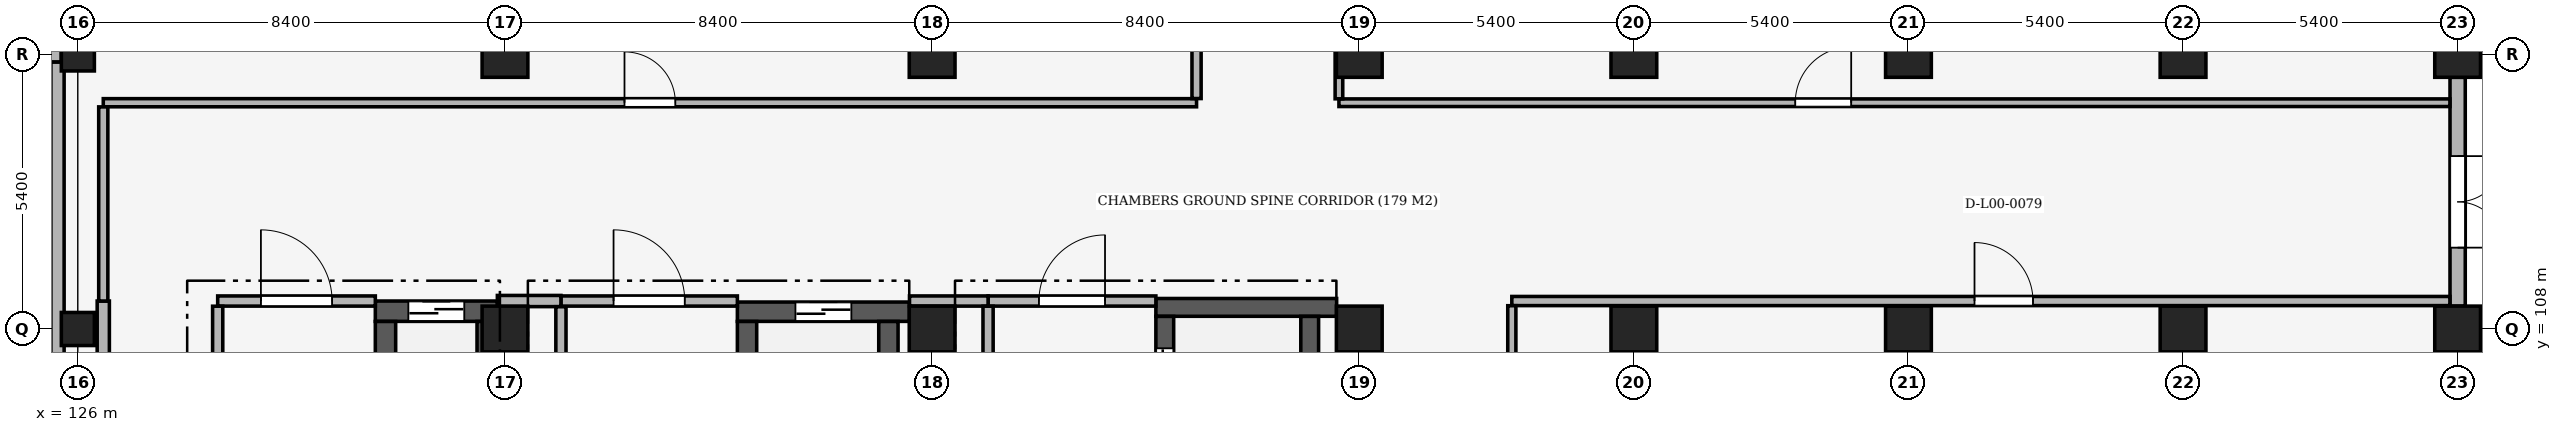
"""IFC4 building model, lengths in metres.
Left out: names, types, materials, properties, quantities, classifications, styles, units other than length and angle.
Written with IfcOpenShell. Run it as: python <this file> out.ifc"""

import sys

from ifc_helpers import new_model, si_unit, direction, frame, frame_2d, origin, origin_2d, place, context, subcontext, project, spatial, rectangle, extrude, element, fill, save


model = new_model("IFC4")
c1 = context("Model", 3, precision=1e-05, world=origin(), true_north=direction((0.0, 1.0)))
c2 = subcontext(c1, "Body", "Model", "MODEL_VIEW")
j1 = project(units=[si_unit("LENGTHUNIT", "METRE"), si_unit("PLANEANGLEUNIT", "RADIAN")], contexts=[c1])
p1 = place(None, origin())
s1 = spatial("IfcSite", under=j1, at=p1, CompositionType="ELEMENT")
p2 = place(p1, origin())
s2 = spatial("IfcBuilding", under=s1, at=p2, CompositionType="ELEMENT")
p3 = place(p2, origin())
s3 = spatial("IfcBuildingStorey", under=s2, at=p3, CompositionType="ELEMENT", Elevation=0.0)
for number, where, z_axis, x_axis in (
    (1, (126.0, 108.0, 0.0), (0.0, 0.0, 1.0), (1.0, 0.0, 0.0)),
    (2, (126.0, 113.4, 0.0), (0.0, 0.0, 1.0), (1.0, 0.0, 0.0)),
):
    element("IfcColumn", number, at=place(p3, frame(where, z_axis=z_axis, x_axis=x_axis)), inside=s3, PredefinedType="COLUMN", context=c2, shape_type="SweptSolid", body=[
        extrude(rectangle(XDim=0.65, YDim=0.65, at=origin_2d()), origin(), (0.0, 0.0, 1.0), 5.1),
    ])
for number, where, z_axis, x_axis in (
    (3, (134.4, 108.0, 0.0), (0.0, 0.0, 1.0), (1.0, 0.0, 0.0)),
    (4, (134.4, 113.4, 0.0), (0.0, 0.0, 1.0), (1.0, 0.0, 0.0)),
    (5, (142.8, 108.0, 0.0), (0.0, 0.0, 1.0), (1.0, 0.0, 0.0)),
    (6, (142.8, 113.4, 0.0), (0.0, 0.0, 1.0), (1.0, 0.0, 0.0)),
    (7, (151.2, 108.0, 0.0), (0.0, 0.0, 1.0), (1.0, 0.0, 0.0)),
    (8, (151.2, 113.4, 0.0), (0.0, 0.0, 1.0), (1.0, 0.0, 0.0)),
    (9, (156.6, 108.0, 0.0), (0.0, 0.0, 1.0), (1.0, 0.0, 0.0)),
    (10, (156.6, 113.4, 0.0), (0.0, 0.0, 1.0), (1.0, 0.0, 0.0)),
    (11, (162.0, 108.0, 0.0), (0.0, 0.0, 1.0), (1.0, 0.0, 0.0)),
    (12, (162.0, 113.4, 0.0), (0.0, 0.0, 1.0), (1.0, 0.0, 0.0)),
    (13, (167.4, 108.0, 0.0), (0.0, 0.0, 1.0), (1.0, 0.0, 0.0)),
    (14, (167.4, 113.4, 0.0), (0.0, 0.0, 1.0), (1.0, 0.0, 0.0)),
    (15, (172.8, 108.0, 0.0), (0.0, 0.0, 1.0), (1.0, 0.0, 0.0)),
    (16, (172.8, 113.4, 0.0), (0.0, 0.0, 1.0), (1.0, 0.0, 0.0)),
):
    element("IfcColumn", number, at=place(p3, frame(where, z_axis=z_axis, x_axis=x_axis)), inside=s3, PredefinedType="COLUMN", context=c2, shape_type="SweptSolid", body=[
        extrude(rectangle(XDim=0.9, YDim=0.9, at=origin_2d()), origin(), (0.0, 0.0, 1.0), 5.1),
    ])
p4 = place(p3, frame((117.925, 113.4, 0.0), z_axis=(0.0, 0.0, 1.0), x_axis=(1.0, 0.0, 0.0)))
e17 = element("IfcWall", 17, at=p4, inside=s3, PredefinedType="SOLIDWALL", context=c2, shape_type="SweptSolid", body=[
    extrude(rectangle(XDim=7.75, YDim=0.3, at=frame_2d((3.875, 0.0))), origin(), (0.0, 0.0, 1.0), 4.12),
])
p5 = place(p4, frame((1.183, 0.0, 0.9)))
e18 = element("IfcOpeningElement", 18, at=p5, cuts=e17, PredefinedType="OPENING", context=c2, shape_type="SweptSolid", body=[
    extrude(rectangle(XDim=2.1, YDim=2.1, at=frame_2d((1.05, 1.05))), frame((0.0, 0.165, 0.0), z_axis=(0.0, -1.0, 0.0), x_axis=(1.0, 0.0, 0.0)), (0.0, 0.0, 1.0), 0.33),
])
p6 = place(p4, frame((4.467, 0.0, 0.9)))
e19 = element("IfcOpeningElement", 19, at=p6, cuts=e17, PredefinedType="OPENING", context=c2, shape_type="SweptSolid", body=[
    extrude(rectangle(XDim=2.1, YDim=2.1, at=frame_2d((1.05, 1.05))), frame((0.0, 0.165, 0.0), z_axis=(0.0, -1.0, 0.0), x_axis=(1.0, 0.0, 0.0)), (0.0, 0.0, 1.0), 0.33),
])
p7 = place(p3, frame((172.8, 112.95, 0.0), z_axis=(0.0, 0.0, 1.0), x_axis=(0.0, -1.0, 0.0)))
e20 = element("IfcWall", 20, at=p7, inside=s3, PredefinedType="SOLIDWALL", context=c2, shape_type="SweptSolid", body=[
    extrude(rectangle(XDim=4.5, YDim=0.3, at=frame_2d((2.25, 0.0))), origin(), (0.0, 0.0, 1.0), 4.17),
])
p8 = place(p7, frame((1.55, 0.0, 0.0)))
e21 = element("IfcOpeningElement", 21, at=p8, cuts=e20, PredefinedType="OPENING", context=c2, shape_type="SweptSolid", body=[
    extrude(rectangle(XDim=1.8, YDim=2.2, at=frame_2d((0.9, 1.1))), frame((0.0, 0.165, 0.0), z_axis=(0.0, -1.0, 0.0), x_axis=(1.0, 0.0, 0.0)), (0.0, 0.0, 1.0), 0.33),
])
p9 = place(p3, frame((131.85, 108.35, 0.0), z_axis=(0.0, 0.0, 1.0), x_axis=(1.0, 0.0, 0.0)))
e22 = element("IfcWall", 22, at=p9, inside=s3, PredefinedType="SHEAR", context=c2, shape_type="SweptSolid", body=[
    extrude(rectangle(XDim=2.4, YDim=0.4, at=frame_2d((1.2, 0.0))), origin(), (0.0, 0.0, 1.0), 4.82),
])
p10 = place(p9, frame((0.65, 0.0, 0.0)))
e23 = element("IfcOpeningElement", 23, at=p10, cuts=e22, PredefinedType="OPENING", context=c2, shape_type="SweptSolid", body=[
    extrude(rectangle(XDim=1.1, YDim=2.15, at=frame_2d((0.55, 1.075))), frame((0.0, 0.215, 0.0), z_axis=(0.0, -1.0, 0.0), x_axis=(1.0, 0.0, 0.0)), (0.0, 0.0, 1.0), 0.43),
])
for number, where, z_axis, x_axis in (
    (24, (132.05, 106.093, 0.0), (0.0, 0.0, 1.0), (0.0, 1.0, 0.0)),
    (25, (134.05, 106.093, 0.0), (0.0, 0.0, 1.0), (0.0, 1.0, 0.0)),
):
    element("IfcWall", number, at=place(p3, frame(where, z_axis=z_axis, x_axis=x_axis)), inside=s3, PredefinedType="SHEAR", context=c2, shape_type="SweptSolid", body=[
        extrude(rectangle(XDim=2.055, YDim=0.4, at=frame_2d((1.027, 0.0))), origin(), (0.0, 0.0, 1.0), 4.82),
    ])
p11 = place(p3, frame((138.97, 108.34, 0.0), z_axis=(0.0, 0.0, 1.0), x_axis=(1.0, 0.0, 0.0)))
e26 = element("IfcWall", 26, at=p11, inside=s3, PredefinedType="SHEAR", context=c2, shape_type="SweptSolid", body=[
    extrude(rectangle(XDim=3.385, YDim=0.38, at=frame_2d((1.692, 0.0))), origin(), (0.0, 0.0, 1.0), 4.82),
])
p12 = place(p11, frame((1.142, 0.0, 0.0)))
e27 = element("IfcOpeningElement", 27, at=p12, cuts=e26, PredefinedType="OPENING", context=c2, shape_type="SweptSolid", body=[
    extrude(rectangle(XDim=1.1, YDim=2.15, at=frame_2d((0.55, 1.075))), frame((0.0, 0.205, 0.0), z_axis=(0.0, -1.0, 0.0), x_axis=(1.0, 0.0, 0.0)), (0.0, 0.0, 1.0), 0.41),
])
for number, where, z_axis, x_axis in (
    (28, (139.16, 106.093, 0.0), (0.0, 0.0, 1.0), (0.0, 1.0, 0.0)),
    (29, (141.94, 106.093, 0.0), (0.0, 0.0, 1.0), (0.0, 1.0, 0.0)),
):
    element("IfcWall", number, at=place(p3, frame(where, z_axis=z_axis, x_axis=x_axis)), inside=s3, PredefinedType="SHEAR", context=c2, shape_type="SweptSolid", body=[
        extrude(rectangle(XDim=2.055, YDim=0.38, at=frame_2d((1.027, 0.0))), origin(), (0.0, 0.0, 1.0), 4.82),
    ])
p13 = place(p3, frame((147.2, 108.425, 0.0), z_axis=(0.0, 0.0, 1.0), x_axis=(1.0, 0.0, 0.0)))
e30 = element("IfcWall", 30, at=p13, inside=s3, PredefinedType="SHEAR", context=c2, shape_type="SweptSolid", body=[
    extrude(rectangle(XDim=3.555, YDim=0.35, at=frame_2d((1.777, 0.0))), origin(), (0.0, 0.0, 1.0), 4.82),
])
p14 = place(p3, frame((147.375, 105.793, 0.0), z_axis=(0.0, 0.0, 1.0), x_axis=(0.0, 1.0, 0.0)))
e31 = element("IfcWall", 31, at=p14, inside=s3, PredefinedType="SHEAR", context=c2, shape_type="SweptSolid", body=[
    extrude(rectangle(XDim=2.455, YDim=0.35, at=frame_2d((1.228, 0.0))), origin(), (0.0, 0.0, 1.0), 4.82),
])
p15 = place(p14, frame((0.627, 0.0, 0.0)))
e32 = element("IfcOpeningElement", 32, at=p15, cuts=e31, PredefinedType="OPENING", context=c2, shape_type="SweptSolid", body=[
    extrude(rectangle(XDim=1.2, YDim=2.15, at=frame_2d((0.6, 1.075))), frame((0.0, 0.19, 0.0), z_axis=(0.0, -1.0, 0.0), x_axis=(1.0, 0.0, 0.0)), (0.0, 0.0, 1.0), 0.38),
])
p16 = place(p3, frame((150.225, 105.793, 0.0), z_axis=(0.0, 0.0, 1.0), x_axis=(0.0, 1.0, 0.0)))
e33 = element("IfcWall", 33, at=p16, inside=s3, PredefinedType="SHEAR", context=c2, shape_type="SweptSolid", body=[
    extrude(rectangle(XDim=2.455, YDim=0.35, at=frame_2d((1.228, 0.0))), origin(), (0.0, 0.0, 1.0), 4.82),
])
p17 = place(p3, frame((128.75, 108.55, 0.0), z_axis=(0.0, 0.0, 1.0), x_axis=(1.0, 0.0, 0.0)))
e34 = element("IfcWall", 34, at=p17, inside=s3, PredefinedType="PARTITIONING", context=c2, shape_type="SweptSolid", body=[
    extrude(rectangle(XDim=3.1, YDim=0.2, at=frame_2d((1.55, 0.0))), origin(), (0.0, 0.0, 1.0), 4.82),
])
p18 = place(p17, frame((0.85, 0.0, 0.0)))
e35 = element("IfcOpeningElement", 35, at=p18, cuts=e34, PredefinedType="OPENING", context=c2, shape_type="SweptSolid", body=[
    extrude(rectangle(XDim=1.4, YDim=2.2, at=frame_2d((0.7, 1.1))), frame((0.0, 0.115, 0.0), z_axis=(0.0, -1.0, 0.0), x_axis=(1.0, 0.0, 0.0)), (0.0, 0.0, 1.0), 0.23),
])
p19 = place(p3, frame((135.5, 108.55, 0.0), z_axis=(0.0, 0.0, 1.0), x_axis=(1.0, 0.0, 0.0)))
e36 = element("IfcWall", 36, at=p19, inside=s3, PredefinedType="PARTITIONING", context=c2, shape_type="SweptSolid", body=[
    extrude(rectangle(XDim=3.47, YDim=0.2, at=frame_2d((1.735, 0.0))), origin(), (0.0, 0.0, 1.0), 4.82),
])
p20 = place(p19, frame((1.035, 0.0, 0.0)))
e37 = element("IfcOpeningElement", 37, at=p20, cuts=e36, PredefinedType="OPENING", context=c2, shape_type="SweptSolid", body=[
    extrude(rectangle(XDim=1.4, YDim=2.2, at=frame_2d((0.7, 1.1))), frame((0.0, 0.115, 0.0), z_axis=(0.0, -1.0, 0.0), x_axis=(1.0, 0.0, 0.0)), (0.0, 0.0, 1.0), 0.23),
])
p21 = place(p3, frame((143.9, 108.55, 0.0), z_axis=(0.0, 0.0, 1.0), x_axis=(1.0, 0.0, 0.0)))
e38 = element("IfcWall", 38, at=p21, inside=s3, PredefinedType="PARTITIONING", context=c2, shape_type="SweptSolid", body=[
    extrude(rectangle(XDim=3.3, YDim=0.2, at=frame_2d((1.65, 0.0))), origin(), (0.0, 0.0, 1.0), 4.82),
])
p22 = place(p21, frame((1.0, 0.0, 0.0)))
e39 = element("IfcOpeningElement", 39, at=p22, cuts=e38, PredefinedType="OPENING", context=c2, shape_type="SweptSolid", body=[
    extrude(rectangle(XDim=1.3, YDim=2.2, at=frame_2d((0.65, 1.1))), frame((0.0, 0.115, 0.0), z_axis=(0.0, -1.0, 0.0), x_axis=(1.0, 0.0, 0.0)), (0.0, 0.0, 1.0), 0.23),
])
p23 = place(p3, frame((134.25, 108.55, 0.0), z_axis=(0.0, 0.0, 1.0), x_axis=(1.0, 0.0, 0.0)))
e40 = element("IfcWall", 40, at=p23, inside=s3, PredefinedType="PARTITIONING", context=c2, shape_type="SweptSolid", body=[
    extrude(rectangle(XDim=1.25, YDim=0.22, at=frame_2d((0.625, 0.0))), origin(), (0.0, 0.0, 1.0), 4.17),
])
p24 = place(p3, frame((142.355, 108.55, 0.0), z_axis=(0.0, 0.0, 1.0), x_axis=(1.0, 0.0, 0.0)))
e41 = element("IfcWall", 41, at=p24, inside=s3, PredefinedType="PARTITIONING", context=c2, shape_type="SweptSolid", body=[
    extrude(rectangle(XDim=1.545, YDim=0.2, at=frame_2d((0.772, 0.0))), origin(), (0.0, 0.0, 1.0), 4.17),
])
p25 = place(p3, frame((154.2, 108.55, 0.0), z_axis=(0.0, 0.0, 1.0), x_axis=(1.0, 0.0, 0.0)))
e42 = element("IfcWall", 42, at=p25, inside=s3, PredefinedType="PARTITIONING", context=c2, shape_type="SweptSolid", body=[
    extrude(rectangle(XDim=18.448, YDim=0.18, at=frame_2d((9.224, 0.0))), origin(), (0.0, 0.0, 1.0), 4.17),
])
p26 = place(p25, frame((9.099, 0.0, 0.0)))
e43 = element("IfcOpeningElement", 43, at=p26, cuts=e42, PredefinedType="OPENING", context=c2, shape_type="SweptSolid", body=[
    extrude(rectangle(XDim=1.15, YDim=2.15, at=frame_2d((0.575, 1.075))), frame((0.0, 0.105, 0.0), z_axis=(0.0, -1.0, 0.0), x_axis=(1.0, 0.0, 0.0)), (0.0, 0.0, 1.0), 0.21),
])
p27 = place(p3, frame((126.5, 112.45, 0.0), z_axis=(0.0, 0.0, 1.0), x_axis=(1.0, 0.0, 0.0)))
e44 = element("IfcWall", 44, at=p27, inside=s3, PredefinedType="PARTITIONING", context=c2, shape_type="SweptSolid", body=[
    extrude(rectangle(XDim=21.5, YDim=0.16, at=frame_2d((10.75, 0.0))), origin(), (0.0, 0.0, 1.0), 4.17),
])
p28 = place(p27, frame((10.25, 0.0, 0.0)))
e45 = element("IfcOpeningElement", 45, at=p28, cuts=e44, PredefinedType="OPENING", context=c2, shape_type="SweptSolid", body=[
    extrude(rectangle(XDim=1.0, YDim=2.1, at=frame_2d((0.5, 1.05))), frame((0.0, 0.095, 0.0), z_axis=(0.0, -1.0, 0.0), x_axis=(1.0, 0.0, 0.0)), (0.0, 0.0, 1.0), 0.19),
])
p29 = place(p3, frame((150.8, 112.45, 0.0), z_axis=(0.0, 0.0, 1.0), x_axis=(1.0, 0.0, 0.0)))
e46 = element("IfcWall", 46, at=p29, inside=s3, PredefinedType="PARTITIONING", context=c2, shape_type="SweptSolid", body=[
    extrude(rectangle(XDim=21.848, YDim=0.15, at=frame_2d((10.924, 0.0))), origin(), (0.0, 0.0, 1.0), 4.17),
])
p30 = place(p29, frame((8.974, 0.0, 0.0)))
e47 = element("IfcOpeningElement", 47, at=p30, cuts=e46, PredefinedType="OPENING", context=c2, shape_type="SweptSolid", body=[
    extrude(rectangle(XDim=1.1, YDim=2.1, at=frame_2d((0.55, 1.05))), frame((0.0, 0.09, 0.0), z_axis=(0.0, -1.0, 0.0), x_axis=(1.0, 0.0, 0.0)), (0.0, 0.0, 1.0), 0.18),
])
p31 = place(p3, frame((125.6, 103.522, 0.0), z_axis=(0.0, 0.0, 1.0), x_axis=(0.0, 1.0, 0.0)))
e48 = element("IfcWall", 48, at=p31, inside=s3, PredefinedType="PARTITIONING", context=c2, shape_type="SweptSolid", body=[
    extrude(rectangle(XDim=9.726, YDim=0.26, at=frame_2d((4.863, 0.0))), origin(), (0.0, 0.0, 1.0), 4.12),
])
p32 = place(p3, frame((126.5, 103.522, 0.0), z_axis=(0.0, 0.0, 1.0), x_axis=(0.0, 1.0, 0.0)))
e49 = element("IfcWall", 49, at=p32, inside=s3, PredefinedType="PARTITIONING", context=c2, shape_type="SweptSolid", body=[
    extrude(rectangle(XDim=5.028, YDim=0.24, at=frame_2d((2.514, 0.0))), origin(), (0.0, 0.0, 1.0), 4.82),
])
p33 = place(p3, frame((126.5, 108.55, 0.0), z_axis=(0.0, 0.0, 1.0), x_axis=(0.0, 1.0, 0.0)))
e50 = element("IfcWall", 50, at=p33, inside=s3, PredefinedType="PARTITIONING", context=c2, shape_type="SweptSolid", body=[
    extrude(rectangle(XDim=3.818, YDim=0.18, at=frame_2d((1.909, 0.0))), origin(), (0.0, 0.0, 1.0), 4.82),
])
p34 = place(p3, frame((128.75, 103.652, 0.0), z_axis=(0.0, 0.0, 1.0), x_axis=(0.0, 1.0, 0.0)))
e51 = element("IfcWall", 51, at=p34, inside=s3, PredefinedType="PARTITIONING", context=c2, shape_type="SweptSolid", body=[
    extrude(rectangle(XDim=4.796, YDim=0.2, at=frame_2d((2.398, 0.0))), origin(), (0.0, 0.0, 1.0), 4.82),
])
p35 = place(p3, frame((135.5, 103.632, 0.0), z_axis=(0.0, 0.0, 1.0), x_axis=(0.0, 1.0, 0.0)))
e52 = element("IfcWall", 52, at=p35, inside=s3, PredefinedType="PARTITIONING", context=c2, shape_type="SweptSolid", body=[
    extrude(rectangle(XDim=4.806, YDim=0.2, at=frame_2d((2.403, 0.0))), origin(), (0.0, 0.0, 1.0), 4.82),
])
p36 = place(p3, frame((143.9, 103.602, 0.0), z_axis=(0.0, 0.0, 1.0), x_axis=(0.0, 1.0, 0.0)))
e53 = element("IfcWall", 53, at=p36, inside=s3, PredefinedType="PARTITIONING", context=c2, shape_type="SweptSolid", body=[
    extrude(rectangle(XDim=4.846, YDim=0.2, at=frame_2d((2.423, 0.0))), origin(), (0.0, 0.0, 1.0), 4.82),
])
p37 = place(p3, frame((148.0, 112.532, 0.0), z_axis=(0.0, 0.0, 1.0), x_axis=(0.0, 1.0, 0.0)))
e54 = element("IfcWall", 54, at=p37, inside=s3, PredefinedType="PARTITIONING", context=c2, shape_type="SweptSolid", body=[
    extrude(rectangle(XDim=6.116, YDim=0.18, at=frame_2d((3.058, 0.0))), origin(), (0.0, 0.0, 1.0), 4.12),
])
p38 = place(p3, frame((150.8, 112.527, 0.0), z_axis=(0.0, 0.0, 1.0), x_axis=(0.0, 1.0, 0.0)))
e55 = element("IfcWall", 55, at=p38, inside=s3, PredefinedType="PARTITIONING", context=c2, shape_type="SweptSolid", body=[
    extrude(rectangle(XDim=6.13, YDim=0.15, at=frame_2d((3.065, 0.0))), origin(), (0.0, 0.0, 1.0), 4.12),
])
p39 = place(p3, frame((154.2, 93.752, 0.0), z_axis=(0.0, 0.0, 1.0), x_axis=(0.0, 1.0, 0.0)))
e56 = element("IfcWall", 56, at=p39, inside=s3, PredefinedType="PARTITIONING", context=c2, shape_type="SweptSolid", body=[
    extrude(rectangle(XDim=14.706, YDim=0.16, at=frame_2d((7.353, 0.0))), origin(), (0.0, 0.0, 1.0), 4.22),
])
p40 = place(p8, origin())
e57 = element("IfcDoor", 57, at=p40, inside=s3, OperationType="DOUBLE_DOOR_SINGLE_SWING", PredefinedType="DOOR", context=c2, shape_type="SweptSolid", body=[
    extrude(rectangle(XDim=1.8, YDim=2.2, at=frame_2d((0.9, 1.1))), frame((0.0, 0.025, 0.0), z_axis=(0.0, -1.0, 0.0), x_axis=(1.0, 0.0, 0.0)), (0.0, 0.0, 1.0), 0.05),
])
fill(e21, e57)
p41 = place(p10, origin())
e58 = element("IfcDoor", 58, at=p41, inside=s3, OperationType="DOUBLE_DOOR_SLIDING", PredefinedType="DOOR", context=c2, shape_type="SweptSolid", body=[
    extrude(rectangle(XDim=1.1, YDim=2.15, at=frame_2d((0.55, 1.075))), frame((0.0, 0.025, 0.0), z_axis=(0.0, -1.0, 0.0), x_axis=(1.0, 0.0, 0.0)), (0.0, 0.0, 1.0), 0.05),
])
fill(e23, e58)
p42 = place(p12, origin())
e59 = element("IfcDoor", 59, at=p42, inside=s3, OperationType="DOUBLE_DOOR_SLIDING", PredefinedType="DOOR", context=c2, shape_type="SweptSolid", body=[
    extrude(rectangle(XDim=1.1, YDim=2.15, at=frame_2d((0.55, 1.075))), frame((0.0, 0.025, 0.0), z_axis=(0.0, -1.0, 0.0), x_axis=(1.0, 0.0, 0.0)), (0.0, 0.0, 1.0), 0.05),
])
fill(e27, e59)
p43 = place(p15, origin())
e60 = element("IfcDoor", 60, at=p43, inside=s3, OperationType="DOUBLE_DOOR_SLIDING", PredefinedType="DOOR", context=c2, shape_type="SweptSolid", body=[
    extrude(rectangle(XDim=1.2, YDim=2.15, at=frame_2d((0.6, 1.075))), frame((0.0, 0.025, 0.0), z_axis=(0.0, -1.0, 0.0), x_axis=(1.0, 0.0, 0.0)), (0.0, 0.0, 1.0), 0.05),
])
fill(e32, e60)
p44 = place(p18, origin())
e61 = element("IfcDoor", 61, at=p44, inside=s3, OperationType="SINGLE_SWING_LEFT", PredefinedType="DOOR", context=c2, shape_type="SweptSolid", body=[
    extrude(rectangle(XDim=1.4, YDim=2.2, at=frame_2d((0.7, 1.1))), frame((0.0, 0.025, 0.0), z_axis=(0.0, -1.0, 0.0), x_axis=(1.0, 0.0, 0.0)), (0.0, 0.0, 1.0), 0.05),
])
fill(e35, e61)
p45 = place(p20, origin())
e62 = element("IfcDoor", 62, at=p45, inside=s3, OperationType="SINGLE_SWING_LEFT", PredefinedType="DOOR", context=c2, shape_type="SweptSolid", body=[
    extrude(rectangle(XDim=1.4, YDim=2.2, at=frame_2d((0.7, 1.1))), frame((0.0, 0.025, 0.0), z_axis=(0.0, -1.0, 0.0), x_axis=(1.0, 0.0, 0.0)), (0.0, 0.0, 1.0), 0.05),
])
fill(e37, e62)
p46 = place(p22, origin())
e63 = element("IfcDoor", 63, at=p46, inside=s3, OperationType="SINGLE_SWING_RIGHT", PredefinedType="DOOR", context=c2, shape_type="SweptSolid", body=[
    extrude(rectangle(XDim=1.3, YDim=2.2, at=frame_2d((0.65, 1.1))), frame((0.0, 0.025, 0.0), z_axis=(0.0, -1.0, 0.0), x_axis=(1.0, 0.0, 0.0)), (0.0, 0.0, 1.0), 0.05),
])
fill(e39, e63)
p47 = place(p28, origin())
e64 = element("IfcDoor", 64, at=p47, inside=s3, OperationType="SINGLE_SWING_LEFT", PredefinedType="DOOR", context=c2, shape_type="SweptSolid", body=[
    extrude(rectangle(XDim=1.0, YDim=2.1, at=frame_2d((0.5, 1.05))), frame((0.0, 0.025, 0.0), z_axis=(0.0, -1.0, 0.0), x_axis=(1.0, 0.0, 0.0)), (0.0, 0.0, 1.0), 0.05),
])
fill(e45, e64)
p48 = place(p30, origin())
e65 = element("IfcDoor", 65, at=p48, inside=s3, OperationType="SINGLE_SWING_RIGHT", PredefinedType="DOOR", context=c2, shape_type="SweptSolid", body=[
    extrude(rectangle(XDim=1.1, YDim=2.1, at=frame_2d((0.55, 1.05))), frame((0.0, 0.025, 0.0), z_axis=(0.0, -1.0, 0.0), x_axis=(1.0, 0.0, 0.0)), (0.0, 0.0, 1.0), 0.05),
])
fill(e47, e65)
p49 = place(p26, origin())
e66 = element("IfcDoor", 66, at=p49, inside=s3, OperationType="SINGLE_SWING_LEFT", PredefinedType="DOOR", context=c2, shape_type="SweptSolid", body=[
    extrude(rectangle(XDim=1.15, YDim=2.15, at=frame_2d((0.575, 1.075))), frame((0.0, 0.025, 0.0), z_axis=(0.0, -1.0, 0.0), x_axis=(1.0, 0.0, 0.0)), (0.0, 0.0, 1.0), 0.05),
])
fill(e43, e66)
save(model, sys.argv[1])
